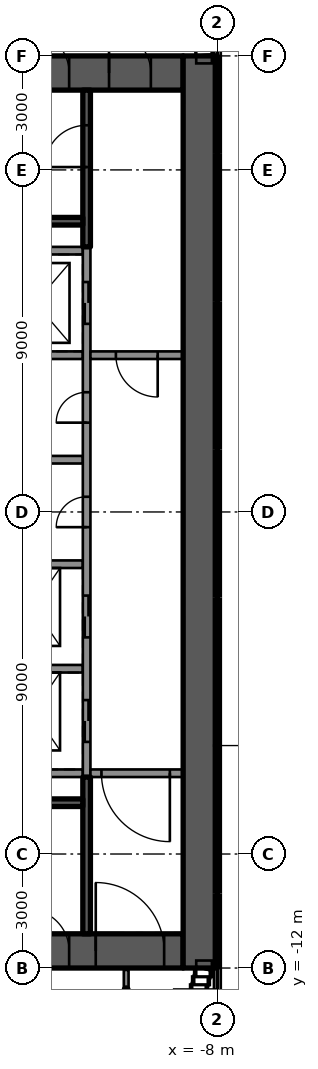
"""IFC4 building model, lengths in metres.
Left out: names, types, materials, properties, quantities, classifications, styles, units other than length and angle.
Written with IfcOpenShell. Run it as: python <this file> out.ifc"""

import sys

from ifc_helpers import new_model, si_unit, direction, frame, frame_2d, origin, place, context, subcontext, project, spatial, rectangle, extrude, element, fill, save


model = new_model("IFC4")
c1 = context("Model", 3, precision=1e-05, world=origin(), true_north=direction((0.0, 1.0)))
c2 = subcontext(c1, "Body", "Model", "MODEL_VIEW")
j1 = project(units=[si_unit("LENGTHUNIT", "METRE"), si_unit("PLANEANGLEUNIT", "RADIAN")], contexts=[c1])
p1 = place(None, origin())
s1 = spatial("IfcSite", under=j1, at=p1, CompositionType="ELEMENT")
p2 = place(p1, origin())
s2 = spatial("IfcBuilding", under=s1, at=p2, CompositionType="ELEMENT")
p3 = place(p2, frame((0.0, 0.0, 257.0)))
s3 = spatial("IfcBuildingStorey", under=s2, at=p3, CompositionType="ELEMENT", Elevation=257.0)
p4 = place(p3, frame((-18.1, 11.55, 0.0), z_axis=(0.0, 0.0, 1.0), x_axis=(1.0, 0.0, 0.0)))
e1 = element("IfcWall", 1, at=p4, inside=s3, PredefinedType="SHEAR", context=c2, shape_type="SweptSolid", body=[
    extrude(rectangle(XDim=9.2, YDim=0.9, at=frame_2d((4.6, 0.0))), origin(), (0.0, 0.0, 1.0), 3.5),
])
p5 = place(p4, frame((7.25, 0.0, 0.0)))
e2 = element("IfcOpeningElement", 2, at=p5, cuts=e1, PredefinedType="OPENING", context=c2, shape_type="SweptSolid", body=[
    extrude(rectangle(XDim=1.1, YDim=2.1, at=frame_2d((0.55, 1.05))), frame((0.0, 0.46, 0.0), z_axis=(0.0, -1.0, 0.0), x_axis=(1.0, 0.0, 0.0)), (0.0, 0.0, 1.0), 0.92),
])
p6 = place(p4, frame((5.1, 0.0, 0.0)))
e3 = element("IfcOpeningElement", 3, at=p6, cuts=e1, PredefinedType="OPENING", context=c2, shape_type="SweptSolid", body=[
    extrude(rectangle(XDim=1.1, YDim=2.1, at=frame_2d((0.55, 1.05))), frame((0.0, 0.46, 0.0), z_axis=(0.0, -1.0, 0.0), x_axis=(1.0, 0.0, 0.0)), (0.0, 0.0, 1.0), 0.92),
])
p7 = place(p3, frame((-18.1, -11.55, 0.0), z_axis=(0.0, 0.0, 1.0), x_axis=(1.0, 0.0, 0.0)))
e4 = element("IfcWall", 4, at=p7, inside=s3, PredefinedType="SHEAR", context=c2, shape_type="SweptSolid", body=[
    extrude(rectangle(XDim=9.2, YDim=0.9, at=frame_2d((4.6, 0.0))), origin(), (0.0, 0.0, 1.0), 3.5),
])
p8 = place(p7, frame((6.9, 0.0, 0.0)))
e5 = element("IfcOpeningElement", 5, at=p8, cuts=e4, PredefinedType="OPENING", context=c2, shape_type="SweptSolid", body=[
    extrude(rectangle(XDim=1.8, YDim=2.1, at=frame_2d((0.9, 1.05))), frame((0.0, 0.46, 0.0), z_axis=(0.0, -1.0, 0.0), x_axis=(1.0, 0.0, 0.0)), (0.0, 0.0, 1.0), 0.92),
])
p9 = place(p7, frame((5.1, 0.0, 0.0)))
e6 = element("IfcOpeningElement", 6, at=p9, cuts=e4, PredefinedType="OPENING", context=c2, shape_type="SweptSolid", body=[
    extrude(rectangle(XDim=1.1, YDim=2.1, at=frame_2d((0.55, 1.05))), frame((0.0, 0.46, 0.0), z_axis=(0.0, -1.0, 0.0), x_axis=(1.0, 0.0, 0.0)), (0.0, 0.0, 1.0), 0.92),
])
p10 = place(p3, frame((-8.45, -12.0, 0.0), z_axis=(0.0, 0.0, 1.0), x_axis=(0.0, 1.0, 0.0)))
e7 = element("IfcWall", 7, at=p10, inside=s3, PredefinedType="SHEAR", context=c2, shape_type="SweptSolid", body=[
    extrude(rectangle(XDim=24.0, YDim=0.9, at=frame_2d((12.0, 0.0))), origin(), (0.0, 0.0, 1.0), 3.5),
])
for number, where, z_axis, x_axis in (
    (8, (-11.54, 6.875, 0.0), (0.0, 0.0, 1.0), (-1.0, 0.0, 0.0)),
    (9, (-11.54, -6.875, 0.0), (0.0, 0.0, 1.0), (-1.0, 0.0, 0.0)),
):
    element("IfcWall", number, at=place(p3, frame(where, z_axis=z_axis, x_axis=x_axis)), inside=s3, PredefinedType="SOLIDWALL", context=c2, shape_type="SweptSolid", body=[
        extrude(rectangle(XDim=6.56, YDim=0.2, at=frame_2d((3.28, 0.0))), origin(), (0.0, 0.0, 1.0), 3.09),
    ])
p11 = place(p3, frame((-11.54, -4.125, 0.0), z_axis=(0.0, 0.0, 1.0), x_axis=(-1.0, 0.0, 0.0)))
e10 = element("IfcWall", 10, at=p11, inside=s3, PredefinedType="SOLIDWALL", context=c2, shape_type="SweptSolid", body=[
    extrude(rectangle(XDim=4.7, YDim=0.2, at=frame_2d((2.35, 0.0))), origin(), (0.0, 0.0, 1.0), 3.09),
])
p12 = place(p3, frame((-11.54, -1.375, 0.0), z_axis=(0.0, 0.0, 1.0), x_axis=(-1.0, 0.0, 0.0)))
e11 = element("IfcWall", 11, at=p12, inside=s3, PredefinedType="SOLIDWALL", context=c2, shape_type="SweptSolid", body=[
    extrude(rectangle(XDim=2.0, YDim=0.2, at=frame_2d((1.0, 0.0))), origin(), (0.0, 0.0, 1.0), 3.09),
])
p13 = place(p3, frame((-11.54, 1.375, 0.0), z_axis=(0.0, 0.0, 1.0), x_axis=(-1.0, 0.0, 0.0)))
e12 = element("IfcWall", 12, at=p13, inside=s3, PredefinedType="SOLIDWALL", context=c2, shape_type="SweptSolid", body=[
    extrude(rectangle(XDim=4.2, YDim=0.2, at=frame_2d((2.1, 0.0))), origin(), (0.0, 0.0, 1.0), 3.09),
])
p14 = place(p3, frame((-11.54, 4.125, 0.0), z_axis=(0.0, 0.0, 1.0), x_axis=(-1.0, 0.0, 0.0)))
e13 = element("IfcWall", 13, at=p14, inside=s3, PredefinedType="SOLIDWALL", context=c2, shape_type="SweptSolid", body=[
    extrude(rectangle(XDim=2.5, YDim=0.2, at=frame_2d((1.25, 0.0))), origin(), (0.0, 0.0, 1.0), 3.09),
])
p15 = place(p3, frame((-11.44, -6.975, 0.0), z_axis=(0.0, 0.0, 1.0), x_axis=(0.0, 1.0, 0.0)))
e14 = element("IfcWall", 14, at=p15, inside=s3, PredefinedType="SOLIDWALL", context=c2, shape_type="SweptSolid", body=[
    extrude(rectangle(XDim=13.95, YDim=0.2, at=frame_2d((6.975, 0.0))), origin(), (0.0, 0.0, 1.0), 3.09),
])
p16 = place(p15, frame((0.925, 0.0, 0.0)))
e15 = element("IfcOpeningElement", 15, at=p16, cuts=e14, PredefinedType="OPENING", context=c2, shape_type="SweptSolid", body=[
    extrude(rectangle(XDim=1.1, YDim=2.1, at=frame_2d((0.55, 1.05))), frame((0.0, 0.11, 0.0), z_axis=(0.0, -1.0, 0.0), x_axis=(1.0, 0.0, 0.0)), (0.0, 0.0, 1.0), 0.22),
])
p17 = place(p15, frame((3.675, 0.0, 0.0)))
e16 = element("IfcOpeningElement", 16, at=p17, cuts=e14, PredefinedType="OPENING", context=c2, shape_type="SweptSolid", body=[
    extrude(rectangle(XDim=1.1, YDim=2.1, at=frame_2d((0.55, 1.05))), frame((0.0, 0.11, 0.0), z_axis=(0.0, -1.0, 0.0), x_axis=(1.0, 0.0, 0.0)), (0.0, 0.0, 1.0), 0.22),
])
p18 = place(p15, frame((11.925, 0.0, 0.0)))
e17 = element("IfcOpeningElement", 17, at=p18, cuts=e14, PredefinedType="OPENING", context=c2, shape_type="SweptSolid", body=[
    extrude(rectangle(XDim=1.1, YDim=2.1, at=frame_2d((0.55, 1.05))), frame((0.0, 0.11, 0.0), z_axis=(0.0, -1.0, 0.0), x_axis=(1.0, 0.0, 0.0)), (0.0, 0.0, 1.0), 0.22),
])
p19 = place(p15, frame((6.575, 0.0, 0.0)))
e18 = element("IfcOpeningElement", 18, at=p19, cuts=e14, PredefinedType="OPENING", context=c2, shape_type="SweptSolid", body=[
    extrude(rectangle(XDim=0.8, YDim=2.1, at=frame_2d((0.4, 1.05))), frame((0.0, 0.11, 0.0), z_axis=(0.0, -1.0, 0.0), x_axis=(1.0, 0.0, 0.0)), (0.0, 0.0, 1.0), 0.22),
])
p20 = place(p15, frame((9.325, 0.0, 0.0)))
e19 = element("IfcOpeningElement", 19, at=p20, cuts=e14, PredefinedType="OPENING", context=c2, shape_type="SweptSolid", body=[
    extrude(rectangle(XDim=0.8, YDim=2.1, at=frame_2d((0.4, 1.05))), frame((0.0, 0.11, 0.0), z_axis=(0.0, -1.0, 0.0), x_axis=(1.0, 0.0, 0.0)), (0.0, 0.0, 1.0), 0.22),
])
p21 = place(p3, frame((-11.44, 6.975, 0.0), z_axis=(0.0, 0.0, 1.0), x_axis=(0.0, 1.0, 0.0)))
e20 = element("IfcWall", 20, at=p21, inside=s3, PredefinedType="SOLIDWALL", context=c2, shape_type="SweptSolid", body=[
    extrude(rectangle(XDim=4.125, YDim=0.2, at=frame_2d((2.062, 0.0))), origin(), (0.0, 0.0, 1.0), 3.09),
])
p22 = place(p21, frame((2.1, 0.0, 0.0)))
e21 = element("IfcOpeningElement", 21, at=p22, cuts=e20, PredefinedType="OPENING", context=c2, shape_type="SweptSolid", body=[
    extrude(rectangle(XDim=1.1, YDim=2.1, at=frame_2d((0.55, 1.05))), frame((0.0, 0.11, 0.0), z_axis=(0.0, -1.0, 0.0), x_axis=(1.0, 0.0, 0.0)), (0.0, 0.0, 1.0), 0.22),
])
p23 = place(p3, frame((-11.54, 7.65, 0.0), z_axis=(0.0, 0.0, 1.0), x_axis=(-1.0, 0.0, 0.0)))
e22 = element("IfcWall", 22, at=p23, inside=s3, PredefinedType="SOLIDWALL", context=c2, shape_type="SweptSolid", body=[
    extrude(rectangle(XDim=6.56, YDim=0.2, at=frame_2d((3.28, 0.0))), origin(), (0.0, 0.0, 1.0), 3.09),
])
p24 = place(p3, frame((-11.44, -11.1, 0.0), z_axis=(0.0, 0.0, 1.0), x_axis=(0.0, 1.0, 0.0)))
e23 = element("IfcWall", 23, at=p24, inside=s3, PredefinedType="SOLIDWALL", context=c2, shape_type="SweptSolid", body=[
    extrude(rectangle(XDim=4.125, YDim=0.2, at=frame_2d((2.062, 0.0))), origin(), (0.0, 0.0, 1.0), 3.09),
])
p25 = place(p3, frame((-11.54, -7.65, 0.0), z_axis=(0.0, 0.0, 1.0), x_axis=(-1.0, 0.0, 0.0)))
e24 = element("IfcWall", 24, at=p25, inside=s3, PredefinedType="SOLIDWALL", context=c2, shape_type="SweptSolid", body=[
    extrude(rectangle(XDim=6.56, YDim=0.2, at=frame_2d((3.28, 0.0))), origin(), (0.0, 0.0, 1.0), 3.09),
])
p26 = place(p3, frame((-8.9, 4.125, 0.0), z_axis=(0.0, 0.0, 1.0), x_axis=(-1.0, 0.0, 0.0)))
e25 = element("IfcWall", 25, at=p26, inside=s3, PredefinedType="PARTITIONING", context=c2, shape_type="SweptSolid", body=[
    extrude(rectangle(XDim=2.44, YDim=0.2, at=frame_2d((1.22, 0.0))), origin(), (0.0, 0.0, 1.0), 3.09),
])
p27 = place(p26, frame((0.67, 0.0, 0.0)))
e26 = element("IfcOpeningElement", 26, at=p27, cuts=e25, PredefinedType="OPENING", context=c2, shape_type="SweptSolid", body=[
    extrude(rectangle(XDim=1.1, YDim=2.1, at=frame_2d((0.55, 1.05))), frame((0.0, 0.11, 0.0), z_axis=(0.0, -1.0, 0.0), x_axis=(1.0, 0.0, 0.0)), (0.0, 0.0, 1.0), 0.22),
])
p28 = place(p3, frame((-8.9, -6.875, 0.0), z_axis=(0.0, 0.0, 1.0), x_axis=(-1.0, 0.0, 0.0)))
e27 = element("IfcWall", 27, at=p28, inside=s3, PredefinedType="PARTITIONING", context=c2, shape_type="SweptSolid", body=[
    extrude(rectangle(XDim=2.44, YDim=0.2, at=frame_2d((1.22, 0.0))), origin(), (0.0, 0.0, 1.0), 3.09),
])
p29 = place(p28, frame((0.35, 0.0, 0.0)))
e28 = element("IfcOpeningElement", 28, at=p29, cuts=e27, PredefinedType="OPENING", context=c2, shape_type="SweptSolid", body=[
    extrude(rectangle(XDim=1.8, YDim=2.1, at=frame_2d((0.9, 1.05))), frame((0.0, 0.11, 0.0), z_axis=(0.0, -1.0, 0.0), x_axis=(1.0, 0.0, 0.0)), (0.0, 0.0, 1.0), 0.22),
])
p30 = place(p3, frame((-10.399, -12.05, 0.0), z_axis=(0.0, 0.0, 1.0), x_axis=(0.0, -1.0, 0.0)))
e29 = element("IfcWall", 29, at=p30, inside=s3, PredefinedType="PARTITIONING", context=c2, shape_type="SweptSolid", body=[
    extrude(rectangle(XDim=2.621, YDim=0.125, at=frame_2d((1.311, 0.0))), origin(), (0.0, 0.0, 1.0), 3.08),
])
p31 = place(p30, frame((0.85, 0.0, 0.0)))
e30 = element("IfcOpeningElement", 30, at=p31, cuts=e29, PredefinedType="OPENING", context=c2, shape_type="SweptSolid", body=[
    extrude(rectangle(XDim=0.9, YDim=2.1, at=frame_2d((0.45, 1.05))), frame((0.0, 0.073, 0.0), z_axis=(0.0, -1.0, 0.0), x_axis=(1.0, 0.0, 0.0)), (0.0, 0.0, 1.0), 0.145),
])
p32 = place(p16, origin())
e31 = element("IfcDoor", 31, at=p32, inside=s3, OperationType="DOUBLE_DOOR_SLIDING", PredefinedType="DOOR", context=c2, shape_type="SweptSolid", body=[
    extrude(rectangle(XDim=1.1, YDim=2.1, at=frame_2d((0.55, 1.05))), frame((0.0, 0.025, 0.0), z_axis=(0.0, -1.0, 0.0), x_axis=(1.0, 0.0, 0.0)), (0.0, 0.0, 1.0), 0.05),
])
fill(e15, e31)
p33 = place(p17, origin())
e32 = element("IfcDoor", 32, at=p33, inside=s3, OperationType="DOUBLE_DOOR_SLIDING", PredefinedType="DOOR", context=c2, shape_type="SweptSolid", body=[
    extrude(rectangle(XDim=1.1, YDim=2.1, at=frame_2d((0.55, 1.05))), frame((0.0, 0.025, 0.0), z_axis=(0.0, -1.0, 0.0), x_axis=(1.0, 0.0, 0.0)), (0.0, 0.0, 1.0), 0.05),
])
fill(e16, e32)
p34 = place(p18, origin())
e33 = element("IfcDoor", 33, at=p34, inside=s3, OperationType="DOUBLE_DOOR_SLIDING", PredefinedType="DOOR", context=c2, shape_type="SweptSolid", body=[
    extrude(rectangle(XDim=1.1, YDim=2.1, at=frame_2d((0.55, 1.05))), frame((0.0, 0.025, 0.0), z_axis=(0.0, -1.0, 0.0), x_axis=(1.0, 0.0, 0.0)), (0.0, 0.0, 1.0), 0.05),
])
fill(e17, e33)
p35 = place(p19, origin())
e34 = element("IfcDoor", 34, at=p35, inside=s3, OperationType="SINGLE_SWING_LEFT", PredefinedType="DOOR", context=c2, shape_type="SweptSolid", body=[
    extrude(rectangle(XDim=0.8, YDim=2.1, at=frame_2d((0.4, 1.05))), frame((0.0, 0.025, 0.0), z_axis=(0.0, -1.0, 0.0), x_axis=(1.0, 0.0, 0.0)), (0.0, 0.0, 1.0), 0.05),
])
fill(e18, e34)
p36 = place(p20, origin())
e35 = element("IfcDoor", 35, at=p36, inside=s3, OperationType="SINGLE_SWING_LEFT", PredefinedType="DOOR", context=c2, shape_type="SweptSolid", body=[
    extrude(rectangle(XDim=0.8, YDim=2.1, at=frame_2d((0.4, 1.05))), frame((0.0, 0.025, 0.0), z_axis=(0.0, -1.0, 0.0), x_axis=(1.0, 0.0, 0.0)), (0.0, 0.0, 1.0), 0.05),
])
fill(e19, e35)
p37 = place(p5, origin())
e36 = element("IfcDoor", 36, at=p37, inside=s3, OperationType="SINGLE_SWING_RIGHT", PredefinedType="DOOR", context=c2, shape_type="SweptSolid", body=[
    extrude(rectangle(XDim=1.1, YDim=2.1, at=frame_2d((0.55, 1.05))), frame((0.0, 0.025, 0.0), z_axis=(0.0, -1.0, 0.0), x_axis=(1.0, 0.0, 0.0)), (0.0, 0.0, 1.0), 0.05),
])
fill(e2, e36)
p38 = place(p27, origin())
e37 = element("IfcDoor", 37, at=p38, inside=s3, OperationType="SINGLE_SWING_RIGHT", PredefinedType="DOOR", context=c2, shape_type="SweptSolid", body=[
    extrude(rectangle(XDim=1.1, YDim=2.1, at=frame_2d((0.55, 1.05))), frame((0.0, 0.025, 0.0), z_axis=(0.0, -1.0, 0.0), x_axis=(1.0, 0.0, 0.0)), (0.0, 0.0, 1.0), 0.05),
])
fill(e26, e37)
p39 = place(p29, origin())
e38 = element("IfcDoor", 38, at=p39, inside=s3, OperationType="DOUBLE_DOOR_DOUBLE_SWING", PredefinedType="DOOR", context=c2, shape_type="SweptSolid", body=[
    extrude(rectangle(XDim=1.8, YDim=2.1, at=frame_2d((0.9, 1.05))), frame((0.0, 0.025, 0.0), z_axis=(0.0, -1.0, 0.0), x_axis=(1.0, 0.0, 0.0)), (0.0, 0.0, 1.0), 0.05),
])
fill(e28, e38)
p40 = place(p8, origin())
e39 = element("IfcDoor", 39, at=p40, inside=s3, OperationType="SINGLE_SWING_RIGHT", PredefinedType="DOOR", context=c2, shape_type="SweptSolid", body=[
    extrude(rectangle(XDim=1.8, YDim=2.1, at=frame_2d((0.9, 1.05))), frame((0.0, 0.025, 0.0), z_axis=(0.0, -1.0, 0.0), x_axis=(1.0, 0.0, 0.0)), (0.0, 0.0, 1.0), 0.05),
])
fill(e5, e39)
p41 = place(p6, origin())
e40 = element("IfcDoor", 40, at=p41, inside=s3, OperationType="SINGLE_SWING_RIGHT", PredefinedType="DOOR", context=c2, shape_type="SweptSolid", body=[
    extrude(rectangle(XDim=1.1, YDim=2.1, at=frame_2d((0.55, 1.05))), frame((0.0, 0.025, 0.0), z_axis=(0.0, -1.0, 0.0), x_axis=(1.0, 0.0, 0.0)), (0.0, 0.0, 1.0), 0.05),
])
fill(e3, e40)
p42 = place(p9, origin())
e41 = element("IfcDoor", 41, at=p42, inside=s3, OperationType="SINGLE_SWING_RIGHT", PredefinedType="DOOR", context=c2, shape_type="SweptSolid", body=[
    extrude(rectangle(XDim=1.1, YDim=2.1, at=frame_2d((0.55, 1.05))), frame((0.0, 0.025, 0.0), z_axis=(0.0, -1.0, 0.0), x_axis=(1.0, 0.0, 0.0)), (0.0, 0.0, 1.0), 0.05),
])
fill(e6, e41)
p43 = place(p22, origin())
e42 = element("IfcDoor", 42, at=p43, inside=s3, OperationType="SINGLE_SWING_RIGHT", PredefinedType="DOOR", context=c2, shape_type="SweptSolid", body=[
    extrude(rectangle(XDim=1.1, YDim=2.1, at=frame_2d((0.55, 1.05))), frame((0.0, 0.025, 0.0), z_axis=(0.0, -1.0, 0.0), x_axis=(1.0, 0.0, 0.0)), (0.0, 0.0, 1.0), 0.05),
])
fill(e21, e42)
save(model, sys.argv[1])
